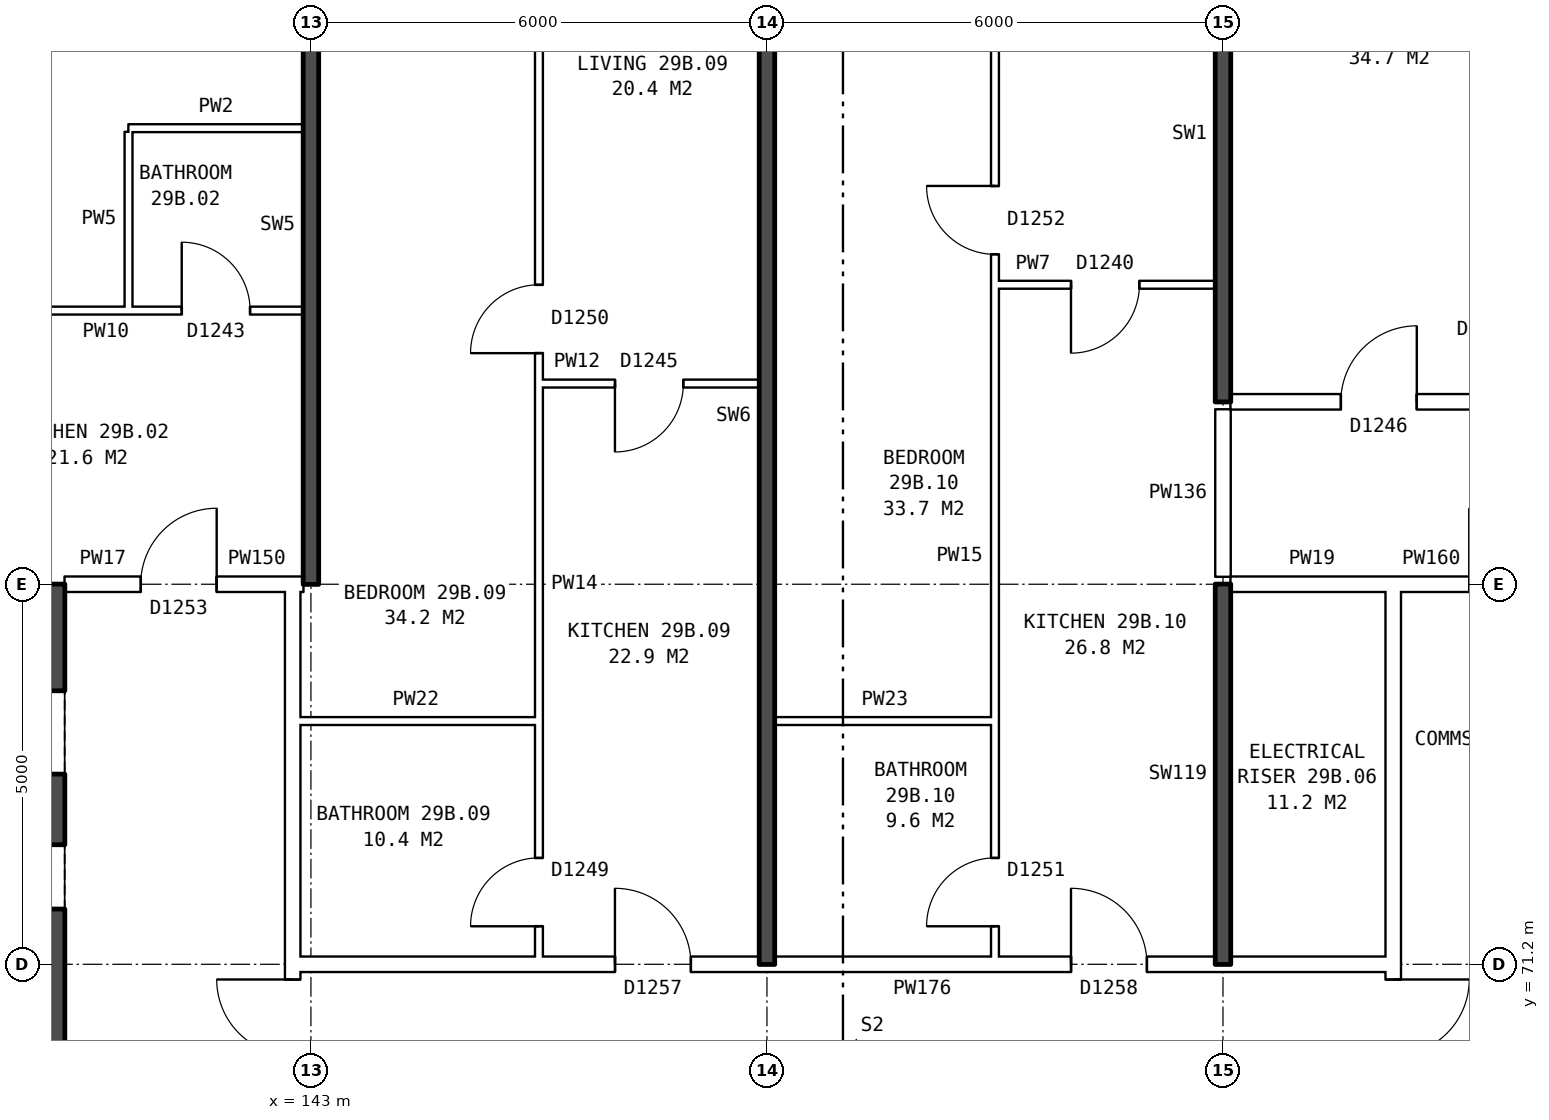
"""IFC4 building model, lengths in metres.
Left out: names, types, materials, properties, quantities, classifications, styles, units other than length and angle.
Written with IfcOpenShell. Run it as: python <this file> out.ifc"""

import sys

from ifc_helpers import new_model, si_unit, direction, frame, frame_2d, origin, place, context, subcontext, project, spatial, rectangle, extrude, element, fill, save


model = new_model("IFC4")
c1 = context("Model", 3, precision=1e-05, world=origin(), true_north=direction((0.0, 1.0)))
c2 = subcontext(c1, "Body", "Model", "MODEL_VIEW")
j1 = project(units=[si_unit("LENGTHUNIT", "METRE"), si_unit("PLANEANGLEUNIT", "RADIAN")], contexts=[c1])
p1 = place(None, origin())
s1 = spatial("IfcSite", under=j1, at=p1, CompositionType="ELEMENT")
p2 = place(p1, origin())
s2 = spatial("IfcBuilding", under=s1, at=p2, CompositionType="ELEMENT")
p3 = place(p2, frame((0.0, 0.0, 105.7)))
s3 = spatial("IfcBuildingStorey", under=s2, at=p3, CompositionType="ELEMENT", Elevation=105.7)
p4 = place(p3, frame((139.435, 64.45, 0.0), z_axis=(0.0, 0.0, 1.0), x_axis=(0.0, 1.0, 0.0)))
e1 = element("IfcWall", 1, at=p4, inside=s3, PredefinedType="SHEAR", context=c2, shape_type="SweptSolid", body=[
    extrude(rectangle(XDim=11.1, YDim=0.65, at=frame_2d((5.55, 0.0))), origin(), (0.0, 0.0, 1.0), 2.85),
])
p5 = place(p4, frame((0.675, 0.0, 0.0)))
e2 = element("IfcOpeningElement", 2, at=p5, cuts=e1, PredefinedType="OPENING", context=c2, shape_type="SweptSolid", body=[
    extrude(rectangle(XDim=1.1, YDim=2.1, at=frame_2d((0.55, 1.05))), frame((0.0, 0.335, 0.0), z_axis=(0.0, -1.0, 0.0), x_axis=(1.0, 0.0, 0.0)), (0.0, 0.0, 1.0), 0.67),
])
p6 = place(p4, frame((9.25, 0.0, 0.0)))
e3 = element("IfcOpeningElement", 3, at=p6, cuts=e1, PredefinedType="OPENING", context=c2, shape_type="SweptSolid", body=[
    extrude(rectangle(XDim=1.1, YDim=2.1, at=frame_2d((0.55, 1.05))), frame((0.0, 0.335, 0.0), z_axis=(0.0, -1.0, 0.0), x_axis=(1.0, 0.0, 0.0)), (0.0, 0.0, 1.0), 0.67),
])
p7 = place(p4, frame((7.475, 0.0, 0.0)))
e4 = element("IfcOpeningElement", 4, at=p7, cuts=e1, PredefinedType="OPENING", context=c2, shape_type="SweptSolid", body=[
    extrude(rectangle(XDim=0.85, YDim=2.1, at=frame_2d((0.425, 1.05))), frame((0.0, 0.335, 0.0), z_axis=(0.0, -1.0, 0.0), x_axis=(1.0, 0.0, 0.0)), (0.0, 0.0, 1.0), 0.67),
])
p8 = place(p3, frame((139.76, 75.875, 0.0), z_axis=(0.0, 0.0, 1.0), x_axis=(-1.0, 0.0, 0.0)))
e5 = element("IfcWall", 5, at=p8, inside=s3, PredefinedType="SHEAR", context=c2, shape_type="SweptSolid", body=[
    extrude(rectangle(XDim=8.4, YDim=0.65, at=frame_2d((4.2, 0.0))), origin(), (0.0, 0.0, 1.0), 2.85),
])
p9 = place(p3, frame((142.76, 63.9, 0.0), z_axis=(0.0, 0.0, 1.0), x_axis=(0.0, 1.0, 0.0)))
e6 = element("IfcWall", 6, at=p9, inside=s3, PredefinedType="PARTITIONING", context=c2, shape_type="SweptSolid", body=[
    extrude(rectangle(XDim=12.2, YDim=0.2, at=frame_2d((6.1, 0.0))), origin(), (0.0, 0.0, 1.0), 2.85),
])
p10 = place(p9, frame((5.1, 0.0, 0.0)))
e7 = element("IfcOpeningElement", 7, at=p10, cuts=e6, PredefinedType="OPENING", context=c2, shape_type="SweptSolid", body=[
    extrude(rectangle(XDim=2.0, YDim=2.1, at=frame_2d((1.0, 1.05))), frame((0.0, 0.11, 0.0), z_axis=(0.0, -1.0, 0.0), x_axis=(1.0, 0.0, 0.0)), (0.0, 0.0, 1.0), 0.22),
])
p11 = place(p3, frame((157.24, 63.9, 0.0), z_axis=(0.0, 0.0, 1.0), x_axis=(0.0, 1.0, 0.0)))
e8 = element("IfcWall", 8, at=p11, inside=s3, PredefinedType="PARTITIONING", context=c2, shape_type="SweptSolid", body=[
    extrude(rectangle(XDim=12.2, YDim=0.2, at=frame_2d((6.1, 0.0))), origin(), (0.0, 0.0, 1.0), 2.85),
])
p12 = place(p11, frame((5.1, 0.0, 0.0)))
e9 = element("IfcOpeningElement", 9, at=p12, cuts=e8, PredefinedType="OPENING", context=c2, shape_type="SweptSolid", body=[
    extrude(rectangle(XDim=2.0, YDim=2.1, at=frame_2d((1.0, 1.05))), frame((0.0, 0.11, 0.0), z_axis=(0.0, -1.0, 0.0), x_axis=(1.0, 0.0, 0.0)), (0.0, 0.0, 1.0), 0.22),
])
p13 = place(p3, frame((142.76, 71.2, 0.0), z_axis=(0.0, 0.0, 1.0), x_axis=(1.0, 0.0, 0.0)))
e10 = element("IfcWall", 10, at=p13, inside=s3, PredefinedType="PARTITIONING", context=c2, shape_type="SweptSolid", body=[
    extrude(rectangle(XDim=14.48, YDim=0.2, at=frame_2d((7.24, 0.0))), origin(), (0.0, 0.0, 1.0), 2.85),
])
p14 = place(p13, frame((4.24, 0.0, 0.0)))
e11 = element("IfcOpeningElement", 11, at=p14, cuts=e10, PredefinedType="OPENING", context=c2, shape_type="SweptSolid", body=[
    extrude(rectangle(XDim=1.0, YDim=2.1, at=frame_2d((0.5, 1.05))), frame((0.0, 0.11, 0.0), z_axis=(0.0, -1.0, 0.0), x_axis=(1.0, 0.0, 0.0)), (0.0, 0.0, 1.0), 0.22),
])
p15 = place(p13, frame((10.24, 0.0, 0.0)))
e12 = element("IfcOpeningElement", 12, at=p15, cuts=e10, PredefinedType="OPENING", context=c2, shape_type="SweptSolid", body=[
    extrude(rectangle(XDim=1.0, YDim=2.1, at=frame_2d((0.5, 1.05))), frame((0.0, 0.11, 0.0), z_axis=(0.0, -1.0, 0.0), x_axis=(1.0, 0.0, 0.0)), (0.0, 0.0, 1.0), 0.22),
])
p16 = place(p3, frame((142.76, 74.4, 0.0), z_axis=(0.0, 0.0, 1.0), x_axis=(1.0, 0.0, 0.0)))
e13 = element("IfcWall", 13, at=p16, inside=s3, PredefinedType="PARTITIONING", context=c2, shape_type="SweptSolid", body=[
    extrude(rectangle(XDim=3.24, YDim=0.1, at=frame_2d((1.62, 0.0))), origin(), (0.0, 0.0, 1.0), 2.85),
])
p17 = place(p3, frame((149.1, 74.4, 0.0), z_axis=(0.0, 0.0, 1.0), x_axis=(1.0, 0.0, 0.0)))
e14 = element("IfcWall", 14, at=p17, inside=s3, PredefinedType="PARTITIONING", context=c2, shape_type="SweptSolid", body=[
    extrude(rectangle(XDim=2.9, YDim=0.1, at=frame_2d((1.45, 0.0))), origin(), (0.0, 0.0, 1.0), 2.85),
])
p18 = place(p3, frame((139.76, 76.2, 0.0), z_axis=(0.0, 0.0, 1.0), x_axis=(1.0, 0.0, 0.0)))
e15 = element("IfcWall", 15, at=p18, inside=s3, PredefinedType="PARTITIONING", context=c2, shape_type="SweptSolid", body=[
    extrude(rectangle(XDim=3.0, YDim=0.2, at=frame_2d((1.5, 0.0))), origin(), (0.0, 0.0, 1.0), 2.85),
])
p19 = place(p18, frame((1.0, 0.0, 0.0)))
e16 = element("IfcOpeningElement", 16, at=p19, cuts=e15, PredefinedType="OPENING", context=c2, shape_type="SweptSolid", body=[
    extrude(rectangle(XDim=1.0, YDim=2.1, at=frame_2d((0.5, 1.05))), frame((0.0, 0.11, 0.0), z_axis=(0.0, -1.0, 0.0), x_axis=(1.0, 0.0, 0.0)), (0.0, 0.0, 1.0), 0.22),
])
p20 = place(p3, frame((142.76, 76.2, 0.0), z_axis=(0.0, 0.0, 1.0), x_axis=(1.0, 0.0, 0.0)))
e17 = element("IfcWall", 17, at=p20, inside=s3, PredefinedType="PARTITIONING", context=c2, shape_type="SweptSolid", body=[
    extrude(rectangle(XDim=0.14, YDim=0.2, at=frame_2d((0.07, 0.0))), origin(), (0.0, 0.0, 1.0), 2.85),
])
p21 = place(p3, frame((155.1, 76.2, 0.0), z_axis=(0.0, 0.0, 1.0), x_axis=(1.0, 0.0, 0.0)))
e18 = element("IfcWall", 18, at=p21, inside=s3, PredefinedType="PARTITIONING", context=c2, shape_type="SweptSolid", body=[
    extrude(rectangle(XDim=2.14, YDim=0.2, at=frame_2d((1.07, 0.0))), origin(), (0.0, 0.0, 1.0), 2.85),
])
p22 = place(p3, frame((157.24, 76.2, 0.0), z_axis=(0.0, 0.0, 1.0), x_axis=(1.0, 0.0, 0.0)))
e19 = element("IfcWall", 19, at=p22, inside=s3, PredefinedType="PARTITIONING", context=c2, shape_type="SweptSolid", body=[
    extrude(rectangle(XDim=3.0, YDim=0.2, at=frame_2d((1.5, 0.0))), origin(), (0.0, 0.0, 1.0), 2.85),
])
p23 = place(p22, frame((1.0, 0.0, 0.0)))
e20 = element("IfcOpeningElement", 20, at=p23, cuts=e19, PredefinedType="OPENING", context=c2, shape_type="SweptSolid", body=[
    extrude(rectangle(XDim=1.0, YDim=2.1, at=frame_2d((0.5, 1.05))), frame((0.0, 0.11, 0.0), z_axis=(0.0, -1.0, 0.0), x_axis=(1.0, 0.0, 0.0)), (0.0, 0.0, 1.0), 0.22),
])
p24 = place(p3, frame((155.1, 78.6, 0.0), z_axis=(0.0, 0.0, 1.0), x_axis=(1.0, 0.0, 0.0)))
e21 = element("IfcWall", 21, at=p24, inside=s3, PredefinedType="PARTITIONING", context=c2, shape_type="SweptSolid", body=[
    extrude(rectangle(XDim=18.54, YDim=0.2, at=frame_2d((9.27, 0.0))), origin(), (0.0, 0.0, 1.0), 2.85),
])
p25 = place(p24, frame((1.45, 0.0, 0.0)))
e22 = element("IfcOpeningElement", 22, at=p25, cuts=e21, PredefinedType="OPENING", context=c2, shape_type="SweptSolid", body=[
    extrude(rectangle(XDim=1.0, YDim=2.1, at=frame_2d((0.5, 1.05))), frame((0.0, 0.11, 0.0), z_axis=(0.0, -1.0, 0.0), x_axis=(1.0, 0.0, 0.0)), (0.0, 0.0, 1.0), 0.22),
])
p26 = place(p24, frame((9.6, 0.0, 0.0)))
e23 = element("IfcOpeningElement", 23, at=p26, cuts=e21, PredefinedType="OPENING", context=c2, shape_type="SweptSolid", body=[
    extrude(rectangle(XDim=1.0, YDim=2.1, at=frame_2d((0.5, 1.05))), frame((0.0, 0.11, 0.0), z_axis=(0.0, -1.0, 0.0), x_axis=(1.0, 0.0, 0.0)), (0.0, 0.0, 1.0), 0.22),
])
p27 = place(p24, frame((15.92, 0.0, 0.0)))
e24 = element("IfcOpeningElement", 24, at=p27, cuts=e21, PredefinedType="OPENING", context=c2, shape_type="SweptSolid", body=[
    extrude(rectangle(XDim=1.0, YDim=2.1, at=frame_2d((0.5, 1.05))), frame((0.0, 0.11, 0.0), z_axis=(0.0, -1.0, 0.0), x_axis=(1.0, 0.0, 0.0)), (0.0, 0.0, 1.0), 0.22),
])
p28 = place(p3, frame((146.0, 78.84, 0.0), z_axis=(0.0, 0.0, 1.0), x_axis=(1.0, 0.0, 0.0)))
e25 = element("IfcWall", 25, at=p28, inside=s3, PredefinedType="PARTITIONING", context=c2, shape_type="SweptSolid", body=[
    extrude(rectangle(XDim=2.9, YDim=0.1, at=frame_2d((1.45, 0.0))), origin(), (0.0, 0.0, 1.0), 2.85),
])
p29 = place(p28, frame((1.0, 0.0, 0.0)))
e26 = element("IfcOpeningElement", 26, at=p29, cuts=e25, PredefinedType="OPENING", context=c2, shape_type="SweptSolid", body=[
    extrude(rectangle(XDim=0.9, YDim=2.1, at=frame_2d((0.45, 1.05))), frame((0.0, 0.06, 0.0), z_axis=(0.0, -1.0, 0.0), x_axis=(1.0, 0.0, 0.0)), (0.0, 0.0, 1.0), 0.12),
])
p30 = place(p3, frame((137.1, 79.8, 0.0), z_axis=(0.0, 0.0, 1.0), x_axis=(1.0, 0.0, 0.0)))
e27 = element("IfcWall", 27, at=p30, inside=s3, PredefinedType="PARTITIONING", context=c2, shape_type="SweptSolid", body=[
    extrude(rectangle(XDim=5.8, YDim=0.1, at=frame_2d((2.9, 0.0))), origin(), (0.0, 0.0, 1.0), 2.85),
])
p31 = place(p30, frame((1.3, 0.0, 0.0)))
e28 = element("IfcOpeningElement", 28, at=p31, cuts=e27, PredefinedType="OPENING", context=c2, shape_type="SweptSolid", body=[
    extrude(rectangle(XDim=0.9, YDim=2.1, at=frame_2d((0.45, 1.05))), frame((0.0, 0.06, 0.0), z_axis=(0.0, -1.0, 0.0), x_axis=(1.0, 0.0, 0.0)), (0.0, 0.0, 1.0), 0.12),
])
p32 = place(p30, frame((4.2, 0.0, 0.0)))
e29 = element("IfcOpeningElement", 29, at=p32, cuts=e27, PredefinedType="OPENING", context=c2, shape_type="SweptSolid", body=[
    extrude(rectangle(XDim=0.9, YDim=2.1, at=frame_2d((0.45, 1.05))), frame((0.0, 0.06, 0.0), z_axis=(0.0, -1.0, 0.0), x_axis=(1.0, 0.0, 0.0)), (0.0, 0.0, 1.0), 0.12),
])
p33 = place(p3, frame((152.0, 80.14, 0.0), z_axis=(0.0, 0.0, 1.0), x_axis=(1.0, 0.0, 0.0)))
e30 = element("IfcWall", 30, at=p33, inside=s3, PredefinedType="PARTITIONING", context=c2, shape_type="SweptSolid", body=[
    extrude(rectangle(XDim=2.9, YDim=0.1, at=frame_2d((1.45, 0.0))), origin(), (0.0, 0.0, 1.0), 2.85),
])
p34 = place(p33, frame((1.0, 0.0, 0.0)))
e31 = element("IfcOpeningElement", 31, at=p34, cuts=e30, PredefinedType="OPENING", context=c2, shape_type="SweptSolid", body=[
    extrude(rectangle(XDim=0.9, YDim=2.1, at=frame_2d((0.45, 1.05))), frame((0.0, 0.06, 0.0), z_axis=(0.0, -1.0, 0.0), x_axis=(1.0, 0.0, 0.0)), (0.0, 0.0, 1.0), 0.12),
])
for number, where, z_axis, x_axis in (
    (32, (140.6, 82.2, 0.0), (0.0, 0.0, 1.0), (1.0, 0.0, 0.0)),
    (33, (140.6, 79.85, 0.0), (0.0, 0.0, 1.0), (0.0, 1.0, 0.0)),
):
    element("IfcWall", number, at=place(p3, frame(where, z_axis=z_axis, x_axis=x_axis)), inside=s3, PredefinedType="PARTITIONING", context=c2, shape_type="SweptSolid", body=[
        extrude(rectangle(XDim=2.3, YDim=0.1, at=frame_2d((1.15, 0.0))), origin(), (0.0, 0.0, 1.0), 2.85),
    ])
p35 = place(p3, frame((143.0, 76.2, 0.0), z_axis=(0.0, 0.0, 1.0), x_axis=(0.0, 1.0, 0.0)))
e34 = element("IfcWall", 34, at=p35, inside=s3, PredefinedType="SOLIDWALL", context=c2, shape_type="SweptSolid", body=[
    extrude(rectangle(XDim=9.44, YDim=0.2, at=frame_2d((4.72, 0.0))), origin(), (0.0, 0.0, 1.0), 2.85),
])
p36 = place(p3, frame((146.0, 71.3, 0.0), z_axis=(0.0, 0.0, 1.0), x_axis=(0.0, 1.0, 0.0)))
e35 = element("IfcWall", 35, at=p36, inside=s3, PredefinedType="PARTITIONING", context=c2, shape_type="SweptSolid", body=[
    extrude(rectangle(XDim=14.34, YDim=0.1, at=frame_2d((7.17, 0.0))), origin(), (0.0, 0.0, 1.0), 2.85),
])
p37 = place(p36, frame((7.94, 0.0, 0.0)))
e36 = element("IfcOpeningElement", 36, at=p37, cuts=e35, PredefinedType="OPENING", context=c2, shape_type="SweptSolid", body=[
    extrude(rectangle(XDim=0.9, YDim=2.1, at=frame_2d((0.45, 1.05))), frame((0.0, 0.06, 0.0), z_axis=(0.0, -1.0, 0.0), x_axis=(1.0, 0.0, 0.0)), (0.0, 0.0, 1.0), 0.12),
])
p38 = place(p36, frame((0.4, 0.0, 0.0)))
e37 = element("IfcOpeningElement", 37, at=p38, cuts=e35, PredefinedType="OPENING", context=c2, shape_type="SweptSolid", body=[
    extrude(rectangle(XDim=0.9, YDim=2.1, at=frame_2d((0.45, 1.05))), frame((0.0, 0.06, 0.0), z_axis=(0.0, -1.0, 0.0), x_axis=(1.0, 0.0, 0.0)), (0.0, 0.0, 1.0), 0.12),
])
p39 = place(p3, frame((149.0, 71.2, 0.0), z_axis=(0.0, 0.0, 1.0), x_axis=(0.0, 1.0, 0.0)))
e38 = element("IfcWall", 38, at=p39, inside=s3, PredefinedType="SOLIDWALL", context=c2, shape_type="SweptSolid", body=[
    extrude(rectangle(XDim=14.44, YDim=0.2, at=frame_2d((7.22, 0.0))), origin(), (0.0, 0.0, 1.0), 2.85),
])
p40 = place(p3, frame((152.0, 71.3, 0.0), z_axis=(0.0, 0.0, 1.0), x_axis=(0.0, 1.0, 0.0)))
e39 = element("IfcWall", 39, at=p40, inside=s3, PredefinedType="PARTITIONING", context=c2, shape_type="SweptSolid", body=[
    extrude(rectangle(XDim=14.34, YDim=0.1, at=frame_2d((7.17, 0.0))), origin(), (0.0, 0.0, 1.0), 2.85),
])
p41 = place(p40, frame((9.24, 0.0, 0.0)))
e40 = element("IfcOpeningElement", 40, at=p41, cuts=e39, PredefinedType="OPENING", context=c2, shape_type="SweptSolid", body=[
    extrude(rectangle(XDim=0.9, YDim=2.1, at=frame_2d((0.45, 1.05))), frame((0.0, 0.06, 0.0), z_axis=(0.0, -1.0, 0.0), x_axis=(1.0, 0.0, 0.0)), (0.0, 0.0, 1.0), 0.12),
])
p42 = place(p40, frame((0.4, 0.0, 0.0)))
e41 = element("IfcOpeningElement", 41, at=p42, cuts=e39, PredefinedType="OPENING", context=c2, shape_type="SweptSolid", body=[
    extrude(rectangle(XDim=0.9, YDim=2.1, at=frame_2d((0.45, 1.05))), frame((0.0, 0.06, 0.0), z_axis=(0.0, -1.0, 0.0), x_axis=(1.0, 0.0, 0.0)), (0.0, 0.0, 1.0), 0.12),
])
p43 = place(p3, frame((155.0, 71.2, 0.0), z_axis=(0.0, 0.0, 1.0), x_axis=(0.0, 1.0, 0.0)))
e42 = element("IfcWall", 42, at=p43, inside=s3, PredefinedType="SOLIDWALL", context=c2, shape_type="SweptSolid", body=[
    extrude(rectangle(XDim=5.0, YDim=0.2, at=frame_2d((2.5, 0.0))), origin(), (0.0, 0.0, 1.0), 2.85),
])
p44 = place(p3, frame((155.0, 76.3, 0.0), z_axis=(0.0, 0.0, 1.0), x_axis=(0.0, 1.0, 0.0)))
e43 = element("IfcWall", 43, at=p44, inside=s3, PredefinedType="PARTITIONING", context=c2, shape_type="SweptSolid", body=[
    extrude(rectangle(XDim=2.2, YDim=0.2, at=frame_2d((1.1, 0.0))), origin(), (0.0, 0.0, 1.0), 2.85),
])
p45 = place(p3, frame((155.0, 78.6, 0.0), z_axis=(0.0, 0.0, 1.0), x_axis=(0.0, 1.0, 0.0)))
e44 = element("IfcWall", 44, at=p45, inside=s3, PredefinedType="SOLIDWALL", context=c2, shape_type="SweptSolid", body=[
    extrude(rectangle(XDim=7.04, YDim=0.2, at=frame_2d((3.52, 0.0))), origin(), (0.0, 0.0, 1.0), 2.85),
])
p46 = place(p10, origin())
e45 = element("IfcDoor", 45, at=p46, inside=s3, OperationType="DOUBLE_DOOR_SINGLE_SWING", PredefinedType="DOOR", context=c2, shape_type="SweptSolid", body=[
    extrude(rectangle(XDim=2.0, YDim=2.1, at=frame_2d((1.0, 1.05))), frame((0.0, 0.025, 0.0), z_axis=(0.0, -1.0, 0.0), x_axis=(1.0, 0.0, 0.0)), (0.0, 0.0, 1.0), 0.05),
])
fill(e7, e45)
p47 = place(p12, frame((2.0, 0.0, 0.0), z_axis=(0.0, 0.0, 1.0), x_axis=(-1.0, 0.0, 0.0)))
e46 = element("IfcDoor", 46, at=p47, inside=s3, OperationType="DOUBLE_DOOR_SINGLE_SWING", PredefinedType="DOOR", context=c2, shape_type="SweptSolid", body=[
    extrude(rectangle(XDim=2.0, YDim=2.1, at=frame_2d((1.0, 1.05))), frame((0.0, 0.025, 0.0), z_axis=(0.0, -1.0, 0.0), x_axis=(1.0, 0.0, 0.0)), (0.0, 0.0, 1.0), 0.05),
])
fill(e9, e46)
p48 = place(p19, origin())
e47 = element("IfcDoor", 47, at=p48, inside=s3, OperationType="SINGLE_SWING_RIGHT", PredefinedType="DOOR", context=c2, shape_type="SweptSolid", body=[
    extrude(rectangle(XDim=1.0, YDim=2.1, at=frame_2d((0.5, 1.05))), frame((0.0, 0.025, 0.0), z_axis=(0.0, -1.0, 0.0), x_axis=(1.0, 0.0, 0.0)), (0.0, 0.0, 1.0), 0.05),
])
fill(e16, e47)
p49 = place(p32, origin())
e48 = element("IfcDoor", 48, at=p49, inside=s3, OperationType="SINGLE_SWING_LEFT", PredefinedType="DOOR", context=c2, shape_type="SweptSolid", body=[
    extrude(rectangle(XDim=0.9, YDim=2.1, at=frame_2d((0.45, 1.05))), frame((0.0, 0.025, 0.0), z_axis=(0.0, -1.0, 0.0), x_axis=(1.0, 0.0, 0.0)), (0.0, 0.0, 1.0), 0.05),
])
fill(e29, e48)
p50 = place(p37, origin())
e49 = element("IfcDoor", 49, at=p50, inside=s3, OperationType="SINGLE_SWING_LEFT", PredefinedType="DOOR", context=c2, shape_type="SweptSolid", body=[
    extrude(rectangle(XDim=0.9, YDim=2.1, at=frame_2d((0.45, 1.05))), frame((0.0, 0.025, 0.0), z_axis=(0.0, -1.0, 0.0), x_axis=(1.0, 0.0, 0.0)), (0.0, 0.0, 1.0), 0.05),
])
fill(e36, e49)
p51 = place(p14, origin())
e50 = element("IfcDoor", 50, at=p51, inside=s3, OperationType="SINGLE_SWING_LEFT", PredefinedType="DOOR", context=c2, shape_type="SweptSolid", body=[
    extrude(rectangle(XDim=1.0, YDim=2.1, at=frame_2d((0.5, 1.05))), frame((0.0, 0.025, 0.0), z_axis=(0.0, -1.0, 0.0), x_axis=(1.0, 0.0, 0.0)), (0.0, 0.0, 1.0), 0.05),
])
fill(e11, e50)
p52 = place(p29, frame((0.9, 0.0, 0.0), z_axis=(0.0, 0.0, 1.0), x_axis=(-1.0, 0.0, 0.0)))
e51 = element("IfcDoor", 51, at=p52, inside=s3, OperationType="SINGLE_SWING_RIGHT", PredefinedType="DOOR", context=c2, shape_type="SweptSolid", body=[
    extrude(rectangle(XDim=0.9, YDim=2.1, at=frame_2d((0.45, 1.05))), frame((0.0, 0.025, 0.0), z_axis=(0.0, -1.0, 0.0), x_axis=(1.0, 0.0, 0.0)), (0.0, 0.0, 1.0), 0.05),
])
fill(e26, e51)
p53 = place(p38, origin())
e52 = element("IfcDoor", 52, at=p53, inside=s3, OperationType="SINGLE_SWING_LEFT", PredefinedType="DOOR", context=c2, shape_type="SweptSolid", body=[
    extrude(rectangle(XDim=0.9, YDim=2.1, at=frame_2d((0.45, 1.05))), frame((0.0, 0.025, 0.0), z_axis=(0.0, -1.0, 0.0), x_axis=(1.0, 0.0, 0.0)), (0.0, 0.0, 1.0), 0.05),
])
fill(e37, e52)
p54 = place(p41, origin())
e53 = element("IfcDoor", 53, at=p54, inside=s3, OperationType="SINGLE_SWING_RIGHT", PredefinedType="DOOR", context=c2, shape_type="SweptSolid", body=[
    extrude(rectangle(XDim=0.9, YDim=2.1, at=frame_2d((0.45, 1.05))), frame((0.0, 0.025, 0.0), z_axis=(0.0, -1.0, 0.0), x_axis=(1.0, 0.0, 0.0)), (0.0, 0.0, 1.0), 0.05),
])
fill(e40, e53)
p55 = place(p15, origin())
e54 = element("IfcDoor", 54, at=p55, inside=s3, OperationType="SINGLE_SWING_LEFT", PredefinedType="DOOR", context=c2, shape_type="SweptSolid", body=[
    extrude(rectangle(XDim=1.0, YDim=2.1, at=frame_2d((0.5, 1.05))), frame((0.0, 0.025, 0.0), z_axis=(0.0, -1.0, 0.0), x_axis=(1.0, 0.0, 0.0)), (0.0, 0.0, 1.0), 0.05),
])
fill(e12, e54)
p56 = place(p34, frame((0.9, 0.0, 0.0), z_axis=(0.0, 0.0, 1.0), x_axis=(-1.0, 0.0, 0.0)))
e55 = element("IfcDoor", 55, at=p56, inside=s3, OperationType="SINGLE_SWING_RIGHT", PredefinedType="DOOR", context=c2, shape_type="SweptSolid", body=[
    extrude(rectangle(XDim=0.9, YDim=2.1, at=frame_2d((0.45, 1.05))), frame((0.0, 0.025, 0.0), z_axis=(0.0, -1.0, 0.0), x_axis=(1.0, 0.0, 0.0)), (0.0, 0.0, 1.0), 0.05),
])
fill(e31, e55)
p57 = place(p42, origin())
e56 = element("IfcDoor", 56, at=p57, inside=s3, OperationType="SINGLE_SWING_LEFT", PredefinedType="DOOR", context=c2, shape_type="SweptSolid", body=[
    extrude(rectangle(XDim=0.9, YDim=2.1, at=frame_2d((0.45, 1.05))), frame((0.0, 0.025, 0.0), z_axis=(0.0, -1.0, 0.0), x_axis=(1.0, 0.0, 0.0)), (0.0, 0.0, 1.0), 0.05),
])
fill(e41, e56)
p58 = place(p25, origin())
e57 = element("IfcDoor", 57, at=p58, inside=s3, OperationType="SINGLE_SWING_RIGHT", PredefinedType="DOOR", context=c2, shape_type="SweptSolid", body=[
    extrude(rectangle(XDim=1.0, YDim=2.1, at=frame_2d((0.5, 1.05))), frame((0.0, 0.025, 0.0), z_axis=(0.0, -1.0, 0.0), x_axis=(1.0, 0.0, 0.0)), (0.0, 0.0, 1.0), 0.05),
])
fill(e22, e57)
save(model, sys.argv[1])
